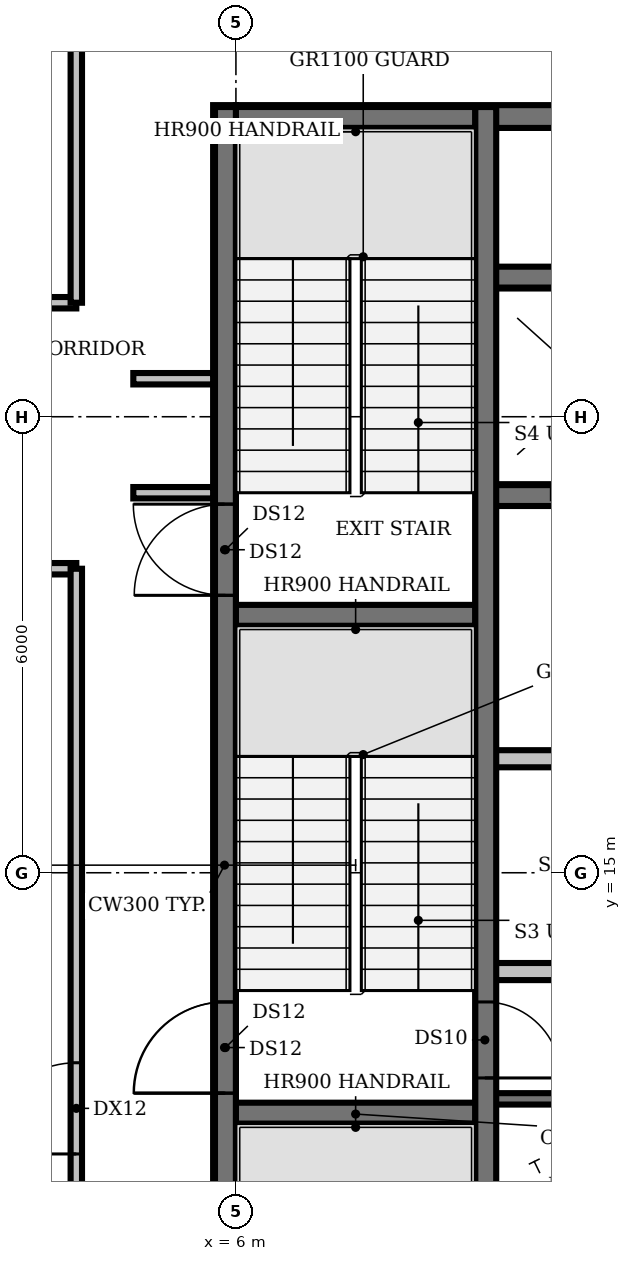
"""IFC4 building model, lengths in metres.
Left out: names, types, materials, properties, quantities, classifications, styles, units other than length and angle.
Written with IfcOpenShell. Run it as: python <this file> out.ifc"""

import sys

from ifc_helpers import new_model, si_unit, direction, frame, frame_2d, origin, place, context, subcontext, project, spatial, rectangle, extrude, element, fill, save


model = new_model("IFC4")
c1 = context("Model", 3, precision=1e-05, world=origin(), true_north=direction((0.0, 1.0)))
c2 = subcontext(c1, "Body", "Model", "MODEL_VIEW")
j1 = project(units=[si_unit("LENGTHUNIT", "METRE"), si_unit("PLANEANGLEUNIT", "RADIAN")], contexts=[c1])
p1 = place(None, origin())
s1 = spatial("IfcSite", under=j1, at=p1, CompositionType="ELEMENT")
p2 = place(p1, origin())
s2 = spatial("IfcBuilding", under=s1, at=p2, CompositionType="ELEMENT")
p3 = place(p2, frame((0.0, 0.0, 339.8)))
s3 = spatial("IfcBuildingStorey", under=s2, at=p3, CompositionType="ELEMENT", Elevation=339.8)
p4 = place(p3, frame((6.0, 11.825, 0.0), z_axis=(0.0, 0.0, 1.0), x_axis=(1.0, 0.0, 0.0)))
e1 = element("IfcWall", 1, at=p4, inside=s3, PredefinedType="SHEAR", context=c2, shape_type="SweptSolid", body=[
    extrude(rectangle(XDim=3.15, YDim=0.25, at=frame_2d((1.575, 0.0))), origin(), (0.0, 0.0, 1.0), 3.9),
])
p5 = place(p3, frame((9.4, 12.025, 0.0), z_axis=(0.0, 0.0, 1.0), x_axis=(1.0, 0.0, 0.0)))
e2 = element("IfcWall", 2, at=p5, inside=s3, PredefinedType="SHEAR", context=c2, shape_type="SweptSolid", body=[
    extrude(rectangle(XDim=1.05, YDim=0.15, at=frame_2d((0.525, 0.0))), origin(), (0.0, 0.0, 1.0), 3.9),
])
p6 = place(p3, frame((9.4, 13.7, 0.0), z_axis=(0.0, 0.0, 1.0), x_axis=(1.0, 0.0, 0.0)))
e3 = element("IfcWall", 3, at=p6, inside=s3, PredefinedType="PARTITIONING", context=c2, shape_type="SweptSolid", body=[
    extrude(rectangle(XDim=4.0, YDim=0.225, at=frame_2d((2.0, 0.0))), origin(), (0.0, 0.0, 1.0), 3.9),
])
p7 = place(p3, frame((9.4, 16.5, 0.0), z_axis=(0.0, 0.0, 1.0), x_axis=(1.0, 0.0, 0.0)))
e4 = element("IfcWall", 4, at=p7, inside=s3, PredefinedType="PARTITIONING", context=c2, shape_type="SweptSolid", body=[
    extrude(rectangle(XDim=14.6, YDim=0.225, at=frame_2d((7.3, 0.0))), origin(), (0.0, 0.0, 1.0), 3.9),
])
p8 = place(p7, frame((0.85, 0.0, 0.0)))
e5 = element("IfcOpeningElement", 5, at=p8, cuts=e4, PredefinedType="OPENING", context=c2, shape_type="SweptSolid", body=[
    extrude(rectangle(XDim=0.9, YDim=2.1, at=frame_2d((0.45, 1.05))), frame((0.0, 0.123, 0.0), z_axis=(0.0, -1.0, 0.0), x_axis=(1.0, 0.0, 0.0)), (0.0, 0.0, 1.0), 0.245),
])
p9 = place(p7, frame((3.625, 0.0, 0.0)))
e6 = element("IfcOpeningElement", 6, at=p9, cuts=e4, PredefinedType="OPENING", context=c2, shape_type="SweptSolid", body=[
    extrude(rectangle(XDim=0.9, YDim=2.1, at=frame_2d((0.45, 1.05))), frame((0.0, 0.123, 0.0), z_axis=(0.0, -1.0, 0.0), x_axis=(1.0, 0.0, 0.0)), (0.0, 0.0, 1.0), 0.245),
])
p10 = place(p7, frame((7.775, 0.0, 0.0)))
e7 = element("IfcOpeningElement", 7, at=p10, cuts=e4, PredefinedType="OPENING", context=c2, shape_type="SweptSolid", body=[
    extrude(rectangle(XDim=1.0, YDim=2.1, at=frame_2d((0.5, 1.05))), frame((0.0, 0.123, 0.0), z_axis=(0.0, -1.0, 0.0), x_axis=(1.0, 0.0, 0.0)), (0.0, 0.0, 1.0), 0.245),
])
p11 = place(p7, frame((11.647, 0.0, 0.0)))
e8 = element("IfcOpeningElement", 8, at=p11, cuts=e4, PredefinedType="OPENING", context=c2, shape_type="SweptSolid", body=[
    extrude(rectangle(XDim=0.9, YDim=2.1, at=frame_2d((0.45, 1.05))), frame((0.0, 0.123, 0.0), z_axis=(0.0, -1.0, 0.0), x_axis=(1.0, 0.0, 0.0)), (0.0, 0.0, 1.0), 0.245),
])
p12 = place(p7, frame((13.423, 0.0, 0.0)))
e9 = element("IfcOpeningElement", 9, at=p12, cuts=e4, PredefinedType="OPENING", context=c2, shape_type="SweptSolid", body=[
    extrude(rectangle(XDim=0.9, YDim=2.1, at=frame_2d((0.45, 1.05))), frame((0.0, 0.123, 0.0), z_axis=(0.0, -1.0, 0.0), x_axis=(1.0, 0.0, 0.0)), (0.0, 0.0, 1.0), 0.245),
])
p13 = place(p3, frame((6.0, 18.375, 0.0), z_axis=(0.0, 0.0, 1.0), x_axis=(1.0, 0.0, 0.0)))
e10 = element("IfcWall", 10, at=p13, inside=s3, PredefinedType="SHEAR", context=c2, shape_type="SweptSolid", body=[
    extrude(rectangle(XDim=3.15, YDim=0.25, at=frame_2d((1.575, 0.0))), origin(), (0.0, 0.0, 1.0), 3.9),
])
p14 = place(p3, frame((24.0, 20.0, 0.0), z_axis=(0.0, 0.0, 1.0), x_axis=(-1.0, 0.0, 0.0)))
e11 = element("IfcWall", 11, at=p14, inside=s3, PredefinedType="PARTITIONING", context=c2, shape_type="SweptSolid", body=[
    extrude(rectangle(XDim=14.6, YDim=0.225, at=frame_2d((7.3, 0.0))), origin(), (0.0, 0.0, 1.0), 3.9),
])
p15 = place(p14, frame((12.75, 0.0, 0.0)))
e12 = element("IfcOpeningElement", 12, at=p15, cuts=e11, PredefinedType="OPENING", context=c2, shape_type="SweptSolid", body=[
    extrude(rectangle(XDim=1.1, YDim=2.1, at=frame_2d((0.55, 1.05))), frame((0.0, 0.123, 0.0), z_axis=(0.0, -1.0, 0.0), x_axis=(1.0, 0.0, 0.0)), (0.0, 0.0, 1.0), 0.245),
])
p16 = place(p14, frame((9.95, 0.0, 0.0)))
e13 = element("IfcOpeningElement", 13, at=p16, cuts=e11, PredefinedType="OPENING", context=c2, shape_type="SweptSolid", body=[
    extrude(rectangle(XDim=1.1, YDim=2.1, at=frame_2d((0.55, 1.05))), frame((0.0, 0.123, 0.0), z_axis=(0.0, -1.0, 0.0), x_axis=(1.0, 0.0, 0.0)), (0.0, 0.0, 1.0), 0.245),
])
p17 = place(p14, frame((7.15, 0.0, 0.0)))
e14 = element("IfcOpeningElement", 14, at=p17, cuts=e11, PredefinedType="OPENING", context=c2, shape_type="SweptSolid", body=[
    extrude(rectangle(XDim=1.1, YDim=2.1, at=frame_2d((0.55, 1.05))), frame((0.0, 0.123, 0.0), z_axis=(0.0, -1.0, 0.0), x_axis=(1.0, 0.0, 0.0)), (0.0, 0.0, 1.0), 0.245),
])
p18 = place(p14, frame((4.35, 0.0, 0.0)))
e15 = element("IfcOpeningElement", 15, at=p18, cuts=e11, PredefinedType="OPENING", context=c2, shape_type="SweptSolid", body=[
    extrude(rectangle(XDim=1.1, YDim=2.1, at=frame_2d((0.55, 1.05))), frame((0.0, 0.123, 0.0), z_axis=(0.0, -1.0, 0.0), x_axis=(1.0, 0.0, 0.0)), (0.0, 0.0, 1.0), 0.245),
])
p19 = place(p14, frame((2.137, 0.0, 0.0)))
e16 = element("IfcOpeningElement", 16, at=p19, cuts=e11, PredefinedType="OPENING", context=c2, shape_type="SweptSolid", body=[
    extrude(rectangle(XDim=0.9, YDim=2.1, at=frame_2d((0.45, 1.05))), frame((0.0, 0.123, 0.0), z_axis=(0.0, -1.0, 0.0), x_axis=(1.0, 0.0, 0.0)), (0.0, 0.0, 1.0), 0.245),
])
p20 = place(p14, frame((0.562, 0.0, 0.0)))
e17 = element("IfcOpeningElement", 17, at=p20, cuts=e11, PredefinedType="OPENING", context=c2, shape_type="SweptSolid", body=[
    extrude(rectangle(XDim=0.9, YDim=2.1, at=frame_2d((0.45, 1.05))), frame((0.0, 0.123, 0.0), z_axis=(0.0, -1.0, 0.0), x_axis=(1.0, 0.0, 0.0)), (0.0, 0.0, 1.0), 0.245),
])
p21 = place(p3, frame((9.4, 22.8, 0.0), z_axis=(0.0, 0.0, 1.0), x_axis=(1.0, 0.0, 0.0)))
e18 = element("IfcWall", 18, at=p21, inside=s3, PredefinedType="PARTITIONING", context=c2, shape_type="SweptSolid", body=[
    extrude(rectangle(XDim=14.6, YDim=0.225, at=frame_2d((7.3, 0.0))), origin(), (0.0, 0.0, 1.0), 3.9),
])
p22 = place(p3, frame((9.275, 11.825, 0.0), z_axis=(0.0, 0.0, 1.0), x_axis=(0.0, -1.0, 0.0)))
e19 = element("IfcWall", 19, at=p22, inside=s3, PredefinedType="SHEAR", context=c2, shape_type="SweptSolid", body=[
    extrude(rectangle(XDim=6.425, YDim=0.25, at=frame_2d((3.212, 0.0))), origin(), (0.0, 0.0, 1.0), 3.9),
])
p23 = place(p22, frame((5.075, 0.0, 0.0)))
e20 = element("IfcOpeningElement", 20, at=p23, cuts=e19, PredefinedType="OPENING", context=c2, shape_type="SweptSolid", body=[
    extrude(rectangle(XDim=1.0, YDim=2.1, at=frame_2d((0.5, 1.05))), frame((0.0, 0.135, 0.0), z_axis=(0.0, -1.0, 0.0), x_axis=(1.0, 0.0, 0.0)), (0.0, 0.0, 1.0), 0.27),
])
p24 = place(p3, frame((9.275, 18.375, 0.0), z_axis=(0.0, 0.0, 1.0), x_axis=(0.0, -1.0, 0.0)))
e21 = element("IfcWall", 21, at=p24, inside=s3, PredefinedType="SHEAR", context=c2, shape_type="SweptSolid", body=[
    extrude(rectangle(XDim=6.55, YDim=0.25, at=frame_2d((3.275, 0.0))), origin(), (0.0, 0.0, 1.0), 3.9),
])
p25 = place(p24, frame((5.075, 0.0, 0.0)))
e22 = element("IfcOpeningElement", 22, at=p25, cuts=e21, PredefinedType="OPENING", context=c2, shape_type="SweptSolid", body=[
    extrude(rectangle(XDim=1.0, YDim=2.1, at=frame_2d((0.5, 1.05))), frame((0.0, 0.135, 0.0), z_axis=(0.0, -1.0, 0.0), x_axis=(1.0, 0.0, 0.0)), (0.0, 0.0, 1.0), 0.27),
])
p26 = place(p3, frame((9.275, 18.375, 0.0), z_axis=(0.0, 0.0, 1.0), x_axis=(0.0, 1.0, 0.0)))
e23 = element("IfcWall", 23, at=p26, inside=s3, PredefinedType="SHEAR", context=c2, shape_type="SweptSolid", body=[
    extrude(rectangle(XDim=6.425, YDim=0.25, at=frame_2d((3.212, 0.0))), origin(), (0.0, 0.0, 1.0), 3.9),
])
p27 = place(p3, frame((5.85, 5.1, 0.0), z_axis=(0.0, 0.0, 1.0), x_axis=(0.0, 1.0, 0.0)))
e24 = element("IfcWall", 24, at=p27, inside=s3, PredefinedType="SHEAR", context=c2, shape_type="SweptSolid", body=[
    extrude(rectangle(XDim=20.0, YDim=0.3, at=frame_2d((10.0, 0.0))), origin(), (0.0, 0.0, 1.0), 3.9),
])
p28 = place(p27, frame((0.55, 0.0, 0.0)))
e25 = element("IfcOpeningElement", 25, at=p28, cuts=e24, PredefinedType="OPENING", context=c2, shape_type="SweptSolid", body=[
    extrude(rectangle(XDim=1.5, YDim=2.1, at=frame_2d((0.75, 1.05))), frame((0.0, 0.16, 0.0), z_axis=(0.0, -1.0, 0.0), x_axis=(1.0, 0.0, 0.0)), (0.0, 0.0, 1.0), 0.32),
])
p29 = place(p27, frame((7.0, 0.0, 0.0)))
e26 = element("IfcOpeningElement", 26, at=p29, cuts=e24, PredefinedType="OPENING", context=c2, shape_type="SweptSolid", body=[
    extrude(rectangle(XDim=1.2, YDim=2.1, at=frame_2d((0.6, 1.05))), frame((0.0, 0.16, 0.0), z_axis=(0.0, -1.0, 0.0), x_axis=(1.0, 0.0, 0.0)), (0.0, 0.0, 1.0), 0.32),
])
p30 = place(p27, frame((13.55, 0.0, 0.0)))
e27 = element("IfcOpeningElement", 27, at=p30, cuts=e24, PredefinedType="OPENING", context=c2, shape_type="SweptSolid", body=[
    extrude(rectangle(XDim=1.2, YDim=2.1, at=frame_2d((0.6, 1.05))), frame((0.0, 0.16, 0.0), z_axis=(0.0, -1.0, 0.0), x_axis=(1.0, 0.0, 0.0)), (0.0, 0.0, 1.0), 0.32),
])
p31 = place(p3, frame((6.0, 24.95, 0.0), z_axis=(0.0, 0.0, 1.0), x_axis=(1.0, 0.0, 0.0)))
e28 = element("IfcWall", 28, at=p31, inside=s3, PredefinedType="SHEAR", context=c2, shape_type="SweptSolid", body=[
    extrude(rectangle(XDim=18.0, YDim=0.3, at=frame_2d((9.0, 0.0))), origin(), (0.0, 0.0, 1.0), 3.9),
])
for number, where, z_axis, x_axis in (
    (29, (6.0, 11.837, 4.2), (0.0, 0.0, 1.0), (1.0, 0.0, 0.0)),
    (30, (6.0, 18.387, 4.2), (0.0, 0.0, 1.0), (1.0, 0.0, 0.0)),
):
    element("IfcWall", number, at=place(p3, frame(where, z_axis=z_axis, x_axis=x_axis)), inside=s3, PredefinedType="SHEAR", context=c2, shape_type="SweptSolid", body=[
        extrude(rectangle(XDim=3.15, YDim=0.275, at=frame_2d((1.575, 0.0))), origin(), (0.0, 0.0, 1.0), 3.0),
    ])
p32 = place(p3, frame((20.4, 19.963, 4.2), z_axis=(0.0, 0.0, 1.0), x_axis=(-1.0, 0.0, 0.0)))
e31 = element("IfcWall", 31, at=p32, inside=s3, PredefinedType="SHEAR", context=c2, shape_type="SweptSolid", body=[
    extrude(rectangle(XDim=11.0, YDim=0.275, at=frame_2d((5.5, 0.0))), origin(), (0.0, 0.0, 1.0), 3.0),
])
p33 = place(p32, frame((5.0, 0.0, 0.0)))
e32 = element("IfcOpeningElement", 32, at=p33, cuts=e31, PredefinedType="OPENING", context=c2, shape_type="SweptSolid", body=[
    extrude(rectangle(XDim=1.0, YDim=2.1, at=frame_2d((0.5, 1.05))), frame((0.0, 0.147, 0.0), z_axis=(0.0, -1.0, 0.0), x_axis=(1.0, 0.0, 0.0)), (0.0, 0.0, 1.0), 0.295),
])
p34 = place(p3, frame((9.4, 22.837, 4.2), z_axis=(0.0, 0.0, 1.0), x_axis=(1.0, 0.0, 0.0)))
e33 = element("IfcWall", 33, at=p34, inside=s3, PredefinedType="SHEAR", context=c2, shape_type="SweptSolid", body=[
    extrude(rectangle(XDim=11.0, YDim=0.275, at=frame_2d((5.5, 0.0))), origin(), (0.0, 0.0, 1.0), 3.0),
])
p35 = place(p3, frame((6.0, 24.938, 4.2), z_axis=(0.0, 0.0, 1.0), x_axis=(1.0, 0.0, 0.0)))
e34 = element("IfcWall", 34, at=p35, inside=s3, PredefinedType="SHEAR", context=c2, shape_type="SweptSolid", body=[
    extrude(rectangle(XDim=3.15, YDim=0.275, at=frame_2d((1.575, 0.0))), origin(), (0.0, 0.0, 1.0), 3.0),
])
p36 = place(p3, frame((5.862, 5.125, 4.2), z_axis=(0.0, 0.0, 1.0), x_axis=(0.0, 1.0, 0.0)))
e35 = element("IfcWall", 35, at=p36, inside=s3, PredefinedType="SHEAR", context=c2, shape_type="SweptSolid", body=[
    extrude(rectangle(XDim=19.95, YDim=0.275, at=frame_2d((9.975, 0.0))), origin(), (0.0, 0.0, 1.0), 3.0),
])
p37 = place(p36, frame((6.975, 0.0, 0.0)))
e36 = element("IfcOpeningElement", 36, at=p37, cuts=e35, PredefinedType="OPENING", context=c2, shape_type="SweptSolid", body=[
    extrude(rectangle(XDim=1.2, YDim=2.1, at=frame_2d((0.6, 1.05))), frame((0.0, 0.147, 0.0), z_axis=(0.0, -1.0, 0.0), x_axis=(1.0, 0.0, 0.0)), (0.0, 0.0, 1.0), 0.295),
])
p38 = place(p36, frame((13.525, 0.0, 0.0)))
e37 = element("IfcOpeningElement", 37, at=p38, cuts=e35, PredefinedType="OPENING", context=c2, shape_type="SweptSolid", body=[
    extrude(rectangle(XDim=1.2, YDim=2.1, at=frame_2d((0.6, 1.05))), frame((0.0, 0.147, 0.0), z_axis=(0.0, -1.0, 0.0), x_axis=(1.0, 0.0, 0.0)), (0.0, 0.0, 1.0), 0.295),
])
p39 = place(p3, frame((9.287, 5.125, 4.2), z_axis=(0.0, 0.0, 1.0), x_axis=(0.0, 1.0, 0.0)))
e38 = element("IfcWall", 38, at=p39, inside=s3, PredefinedType="SHEAR", context=c2, shape_type="SweptSolid", body=[
    extrude(rectangle(XDim=19.95, YDim=0.275, at=frame_2d((9.975, 0.0))), origin(), (0.0, 0.0, 1.0), 3.0),
])
for number, where, z_axis, x_axis in (
    (39, (2.79, 19.0, 0.0), (0.0, 0.0, 1.0), (1.0, 0.0, 0.0)),
    (40, (2.79, 22.5, 0.0), (0.0, 0.0, 1.0), (1.0, 0.0, 0.0)),
):
    element("IfcWall", number, at=place(p3, frame(where, z_axis=z_axis, x_axis=x_axis)), inside=s3, PredefinedType="PARTITIONING", context=c2, shape_type="SweptSolid", body=[
        extrude(rectangle(XDim=1.11, YDim=0.15, at=frame_2d((0.555, 0.0))), origin(), (0.0, 0.0, 1.0), 2.95),
    ])
p40 = place(p3, frame((3.9, 5.1, 0.0), z_axis=(0.0, 0.0, 1.0), x_axis=(0.0, 1.0, 0.0)))
e41 = element("IfcWall", 41, at=p40, inside=s3, PredefinedType="PARTITIONING", context=c2, shape_type="SweptSolid", body=[
    extrude(rectangle(XDim=13.9, YDim=0.15, at=frame_2d((6.95, 0.0))), origin(), (0.0, 0.0, 1.0), 2.95),
])
p41 = place(p40, frame((6.2, 0.0, 0.0)))
e42 = element("IfcOpeningElement", 42, at=p41, cuts=e41, PredefinedType="OPENING", context=c2, shape_type="SweptSolid", body=[
    extrude(rectangle(XDim=1.2, YDim=2.1, at=frame_2d((0.6, 1.05))), frame((0.0, 0.085, 0.0), z_axis=(0.0, -1.0, 0.0), x_axis=(1.0, 0.0, 0.0)), (0.0, 0.0, 1.0), 0.17),
])
p42 = place(p3, frame((3.9, 22.5, 0.0), z_axis=(0.0, 0.0, 1.0), x_axis=(0.0, 1.0, 0.0)))
e43 = element("IfcWall", 43, at=p42, inside=s3, PredefinedType="PARTITIONING", context=c2, shape_type="SweptSolid", body=[
    extrude(rectangle(XDim=4.4, YDim=0.15, at=frame_2d((2.2, 0.0))), origin(), (0.0, 0.0, 1.0), 2.95),
])
for number, where, z_axis, x_axis in (
    (44, (4.65, 20.0, 0.0), (0.0, 0.0, 1.0), (1.0, 0.0, 0.0)),
    (45, (4.65, 21.5, 0.0), (0.0, 0.0, 1.0), (1.0, 0.0, 0.0)),
):
    element("IfcWall", number, at=place(p3, frame(where, z_axis=z_axis, x_axis=x_axis)), inside=s3, PredefinedType="PARTITIONING", context=c2, shape_type="SweptSolid", body=[
        extrude(rectangle(XDim=1.05, YDim=0.15, at=frame_2d((0.525, 0.0))), origin(), (0.0, 0.0, 1.0), 2.95),
    ])
p43 = place(p25, origin())
e46 = element("IfcDoor", 46, at=p43, inside=s3, OperationType="SINGLE_SWING_RIGHT", PredefinedType="DOOR", context=c2, shape_type="SweptSolid", body=[
    extrude(rectangle(XDim=1.0, YDim=2.1, at=frame_2d((0.5, 1.05))), frame((0.0, 0.025, 0.0), z_axis=(0.0, -1.0, 0.0), x_axis=(1.0, 0.0, 0.0)), (0.0, 0.0, 1.0), 0.05),
])
fill(e22, e46)
p44 = place(p29, origin())
e47 = element("IfcDoor", 47, at=p44, inside=s3, OperationType="SINGLE_SWING_LEFT", PredefinedType="DOOR", context=c2, shape_type="SweptSolid", body=[
    extrude(rectangle(XDim=1.2, YDim=2.1, at=frame_2d((0.6, 1.05))), frame((0.0, 0.025, 0.0), z_axis=(0.0, -1.0, 0.0), x_axis=(1.0, 0.0, 0.0)), (0.0, 0.0, 1.0), 0.05),
])
fill(e26, e47)
p45 = place(p30, origin())
e48 = element("IfcDoor", 48, at=p45, inside=s3, OperationType="SINGLE_SWING_RIGHT", PredefinedType="DOOR", context=c2, shape_type="SweptSolid", body=[
    extrude(rectangle(XDim=1.2, YDim=2.1, at=frame_2d((0.6, 1.05))), frame((0.0, 0.025, 0.0), z_axis=(0.0, -1.0, 0.0), x_axis=(1.0, 0.0, 0.0)), (0.0, 0.0, 1.0), 0.05),
])
fill(e27, e48)
p46 = place(p37, origin())
e49 = element("IfcDoor", 49, at=p46, inside=s3, OperationType="SINGLE_SWING_LEFT", PredefinedType="DOOR", context=c2, shape_type="SweptSolid", body=[
    extrude(rectangle(XDim=1.2, YDim=2.1, at=frame_2d((0.6, 1.05))), frame((0.0, 0.025, 0.0), z_axis=(0.0, -1.0, 0.0), x_axis=(1.0, 0.0, 0.0)), (0.0, 0.0, 1.0), 0.05),
])
fill(e36, e49)
p47 = place(p38, origin())
e50 = element("IfcDoor", 50, at=p47, inside=s3, OperationType="SINGLE_SWING_LEFT", PredefinedType="DOOR", context=c2, shape_type="SweptSolid", body=[
    extrude(rectangle(XDim=1.2, YDim=2.1, at=frame_2d((0.6, 1.05))), frame((0.0, 0.025, 0.0), z_axis=(0.0, -1.0, 0.0), x_axis=(1.0, 0.0, 0.0)), (0.0, 0.0, 1.0), 0.05),
])
fill(e37, e50)
p48 = place(p41, origin())
e51 = element("IfcDoor", 51, at=p48, inside=s3, OperationType="SINGLE_SWING_LEFT", PredefinedType="DOOR", context=c2, shape_type="SweptSolid", body=[
    extrude(rectangle(XDim=1.2, YDim=2.1, at=frame_2d((0.6, 1.05))), frame((0.0, 0.025, 0.0), z_axis=(0.0, -1.0, 0.0), x_axis=(1.0, 0.0, 0.0)), (0.0, 0.0, 1.0), 0.05),
])
fill(e42, e51)
save(model, sys.argv[1])
